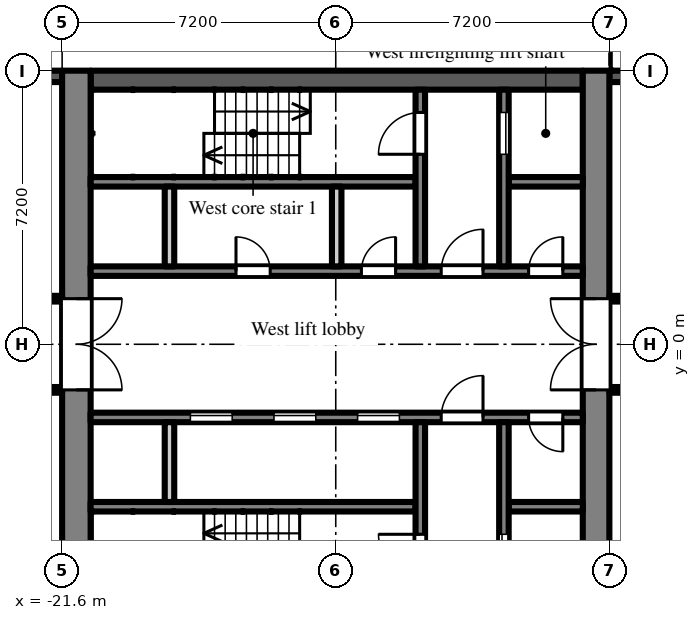
"""IFC4 building model, lengths in metres.
Left out: names, types, materials, properties, quantities, classifications, styles, units other than length and angle.
Written with IfcOpenShell. Run it as: python <this file> out.ifc"""

import sys

from ifc_helpers import new_model, si_unit, direction, frame, frame_2d, origin, place, context, subcontext, project, spatial, rectangle, extrude, element, fill, save


model = new_model("IFC4")
c1 = context("Model", 3, precision=1e-05, world=origin(), true_north=direction((0.0, 1.0)))
c2 = subcontext(c1, "Body", "Model", "MODEL_VIEW")
j1 = project(units=[si_unit("LENGTHUNIT", "METRE"), si_unit("PLANEANGLEUNIT", "RADIAN")], contexts=[c1])
p1 = place(None, origin())
s1 = spatial("IfcSite", under=j1, at=p1, CompositionType="ELEMENT")
p2 = place(p1, origin())
s2 = spatial("IfcBuilding", under=s1, at=p2, CompositionType="ELEMENT")
p3 = place(p2, frame((0.0, 0.0, 75.9)))
s3 = spatial("IfcBuildingStorey", under=s2, at=p3, CompositionType="ELEMENT", Elevation=75.9)
p4 = place(p3, frame((-4.2, 7.05, 0.0), z_axis=(0.0, 0.0, 1.0), x_axis=(-1.0, 0.0, 0.0)))
e1 = element("IfcWall", 1, at=p4, inside=s3, PredefinedType="SOLIDWALL", context=c2, shape_type="SweptSolid", body=[
    extrude(rectangle(XDim=3.0, YDim=0.3, at=frame_2d((1.5, 0.0))), origin(), (0.0, 0.0, 1.0), 2.1),
])
p5 = place(p3, frame((-21.6, 7.05, 0.0), z_axis=(0.0, 0.0, 1.0), x_axis=(-1.0, 0.0, 0.0)))
e2 = element("IfcWall", 2, at=p5, inside=s3, PredefinedType="SOLIDWALL", context=c2, shape_type="SweptSolid", body=[
    extrude(rectangle(XDim=2.7, YDim=0.3, at=frame_2d((1.35, 0.0))), origin(), (0.0, 0.0, 1.0), 2.1),
])
p6 = place(p3, frame((-7.55, -7.2, 0.0), z_axis=(0.0, 0.0, 1.0), x_axis=(0.0, 1.0, 0.0)))
e3 = element("IfcWall", 3, at=p6, inside=s3, PredefinedType="SHEAR", context=c2, shape_type="SweptSolid", body=[
    extrude(rectangle(XDim=14.4, YDim=0.7, at=frame_2d((7.2, 0.0))), origin(), (0.0, 0.0, 1.0), 2.575),
])
p7 = place(p6, frame((6.0, 0.0, 0.0)))
e4 = element("IfcOpeningElement", 4, at=p7, cuts=e3, PredefinedType="OPENING", context=c2, shape_type="SweptSolid", body=[
    extrude(rectangle(XDim=2.4, YDim=2.2, at=frame_2d((1.2, 1.1))), frame((0.0, 0.36, 0.0), z_axis=(0.0, -1.0, 0.0), x_axis=(1.0, 0.0, 0.0)), (0.0, 0.0, 1.0), 0.72),
])
p8 = place(p3, frame((-21.225, -7.2, 0.0), z_axis=(0.0, 0.0, 1.0), x_axis=(0.0, 1.0, 0.0)))
e5 = element("IfcWall", 5, at=p8, inside=s3, PredefinedType="SHEAR", context=c2, shape_type="SweptSolid", body=[
    extrude(rectangle(XDim=14.4, YDim=0.75, at=frame_2d((7.2, 0.0))), origin(), (0.0, 0.0, 1.0), 2.575),
])
p9 = place(p8, frame((6.0, 0.0, 0.0)))
e6 = element("IfcOpeningElement", 6, at=p9, cuts=e5, PredefinedType="OPENING", context=c2, shape_type="SweptSolid", body=[
    extrude(rectangle(XDim=2.4, YDim=2.2, at=frame_2d((1.2, 1.1))), frame((0.0, 0.385, 0.0), z_axis=(0.0, -1.0, 0.0), x_axis=(1.0, 0.0, 0.0)), (0.0, 0.0, 1.0), 0.77),
])
p10 = place(p3, frame((-7.9, 6.95, 0.0), z_axis=(0.0, 0.0, 1.0), x_axis=(-1.0, 0.0, 0.0)))
e7 = element("IfcWall", 7, at=p10, inside=s3, PredefinedType="SHEAR", context=c2, shape_type="SweptSolid", body=[
    extrude(rectangle(XDim=12.95, YDim=0.5, at=frame_2d((6.475, 0.0))), origin(), (0.0, 0.0, 1.0), 2.575),
])
p11 = place(p3, frame((-7.9, 1.925, 0.0), z_axis=(0.0, 0.0, 1.0), x_axis=(-1.0, 0.0, 0.0)))
e8 = element("IfcWall", 8, at=p11, inside=s3, PredefinedType="SHEAR", context=c2, shape_type="SweptSolid", body=[
    extrude(rectangle(XDim=12.95, YDim=0.25, at=frame_2d((6.475, 0.0))), origin(), (0.0, 0.0, 1.0), 2.575),
])
p12 = place(p11, frame((0.525, 0.0, 0.0)))
e9 = element("IfcOpeningElement", 9, at=p12, cuts=e8, PredefinedType="OPENING", context=c2, shape_type="SweptSolid", body=[
    extrude(rectangle(XDim=0.9, YDim=2.1, at=frame_2d((0.45, 1.05))), frame((0.0, 0.135, 0.0), z_axis=(0.0, -1.0, 0.0), x_axis=(1.0, 0.0, 0.0)), (0.0, 0.0, 1.0), 0.27),
])
p13 = place(p11, frame((2.625, 0.0, 0.0)))
e10 = element("IfcOpeningElement", 10, at=p13, cuts=e8, PredefinedType="OPENING", context=c2, shape_type="SweptSolid", body=[
    extrude(rectangle(XDim=1.1, YDim=2.1, at=frame_2d((0.55, 1.05))), frame((0.0, 0.135, 0.0), z_axis=(0.0, -1.0, 0.0), x_axis=(1.0, 0.0, 0.0)), (0.0, 0.0, 1.0), 0.27),
])
p14 = place(p11, frame((4.925, 0.0, 0.0)))
e11 = element("IfcOpeningElement", 11, at=p14, cuts=e8, PredefinedType="OPENING", context=c2, shape_type="SweptSolid", body=[
    extrude(rectangle(XDim=0.9, YDim=2.1, at=frame_2d((0.45, 1.05))), frame((0.0, 0.135, 0.0), z_axis=(0.0, -1.0, 0.0), x_axis=(1.0, 0.0, 0.0)), (0.0, 0.0, 1.0), 0.27),
])
p15 = place(p11, frame((8.225, 0.0, 0.0)))
e12 = element("IfcOpeningElement", 12, at=p15, cuts=e8, PredefinedType="OPENING", context=c2, shape_type="SweptSolid", body=[
    extrude(rectangle(XDim=0.9, YDim=2.1, at=frame_2d((0.45, 1.05))), frame((0.0, 0.135, 0.0), z_axis=(0.0, -1.0, 0.0), x_axis=(1.0, 0.0, 0.0)), (0.0, 0.0, 1.0), 0.27),
])
p16 = place(p3, frame((-7.9, 4.275, 0.0), z_axis=(0.0, 0.0, 1.0), x_axis=(-1.0, 0.0, 0.0)))
e13 = element("IfcWall", 13, at=p16, inside=s3, PredefinedType="SHEAR", context=c2, shape_type="SweptSolid", body=[
    extrude(rectangle(XDim=1.95, YDim=0.25, at=frame_2d((0.975, 0.0))), origin(), (0.0, 0.0, 1.0), 2.575),
])
p17 = place(p3, frame((-12.3, 4.275, 0.0), z_axis=(0.0, 0.0, 1.0), x_axis=(-1.0, 0.0, 0.0)))
e14 = element("IfcWall", 14, at=p17, inside=s3, PredefinedType="SHEAR", context=c2, shape_type="SweptSolid", body=[
    extrude(rectangle(XDim=8.55, YDim=0.25, at=frame_2d((4.275, 0.0))), origin(), (0.0, 0.0, 1.0), 2.575),
])
p18 = place(p3, frame((-9.975, 2.05, 0.0), z_axis=(0.0, 0.0, 1.0), x_axis=(0.0, 1.0, 0.0)))
e15 = element("IfcWall", 15, at=p18, inside=s3, PredefinedType="SHEAR", context=c2, shape_type="SweptSolid", body=[
    extrude(rectangle(XDim=4.65, YDim=0.25, at=frame_2d((2.325, 0.0))), origin(), (0.0, 0.0, 1.0), 2.575),
])
p19 = place(p18, frame((2.95, 0.0, 0.0)))
e16 = element("IfcOpeningElement", 16, at=p19, cuts=e15, PredefinedType="OPENING", context=c2, shape_type="SweptSolid", body=[
    extrude(rectangle(XDim=1.1, YDim=2.1, at=frame_2d((0.55, 1.05))), frame((0.0, 0.135, 0.0), z_axis=(0.0, -1.0, 0.0), x_axis=(1.0, 0.0, 0.0)), (0.0, 0.0, 1.0), 0.27),
])
p20 = place(p3, frame((-12.175, 2.05, 0.0), z_axis=(0.0, 0.0, 1.0), x_axis=(0.0, 1.0, 0.0)))
e17 = element("IfcWall", 17, at=p20, inside=s3, PredefinedType="SHEAR", context=c2, shape_type="SweptSolid", body=[
    extrude(rectangle(XDim=4.65, YDim=0.25, at=frame_2d((2.325, 0.0))), origin(), (0.0, 0.0, 1.0), 2.575),
])
p21 = place(p20, frame((2.95, 0.0, 0.0)))
e18 = element("IfcOpeningElement", 18, at=p21, cuts=e17, PredefinedType="OPENING", context=c2, shape_type="SweptSolid", body=[
    extrude(rectangle(XDim=1.1, YDim=2.1, at=frame_2d((0.55, 1.05))), frame((0.0, 0.135, 0.0), z_axis=(0.0, -1.0, 0.0), x_axis=(1.0, 0.0, 0.0)), (0.0, 0.0, 1.0), 0.27),
])
for number, where, z_axis, x_axis in (
    (19, (-14.375, 2.05, 0.0), (0.0, 0.0, 1.0), (0.0, 1.0, 0.0)),
    (20, (-18.775, 2.05, 0.0), (0.0, 0.0, 1.0), (0.0, 1.0, 0.0)),
):
    element("IfcWall", number, at=place(p3, frame(where, z_axis=z_axis, x_axis=x_axis)), inside=s3, PredefinedType="PARTITIONING", context=c2, shape_type="SweptSolid", body=[
        extrude(rectangle(XDim=2.1, YDim=0.25, at=frame_2d((1.05, 0.0))), origin(), (0.0, 0.0, 1.0), 2.575),
    ])
p22 = place(p3, frame((-7.9, -1.925, 0.0), z_axis=(0.0, 0.0, 1.0), x_axis=(-1.0, 0.0, 0.0)))
e21 = element("IfcWall", 21, at=p22, inside=s3, PredefinedType="SHEAR", context=c2, shape_type="SweptSolid", body=[
    extrude(rectangle(XDim=12.95, YDim=0.25, at=frame_2d((6.475, 0.0))), origin(), (0.0, 0.0, 1.0), 2.575),
])
p23 = place(p22, frame((4.825, 0.0, 0.0)))
e22 = element("IfcOpeningElement", 22, at=p23, cuts=e21, PredefinedType="OPENING", context=c2, shape_type="SweptSolid", body=[
    extrude(rectangle(XDim=1.1, YDim=2.1, at=frame_2d((0.55, 1.05))), frame((0.0, 0.135, 0.0), z_axis=(0.0, -1.0, 0.0), x_axis=(1.0, 0.0, 0.0)), (0.0, 0.0, 1.0), 0.27),
])
p24 = place(p22, frame((7.025, 0.0, 0.0)))
e23 = element("IfcOpeningElement", 23, at=p24, cuts=e21, PredefinedType="OPENING", context=c2, shape_type="SweptSolid", body=[
    extrude(rectangle(XDim=1.1, YDim=2.1, at=frame_2d((0.55, 1.05))), frame((0.0, 0.135, 0.0), z_axis=(0.0, -1.0, 0.0), x_axis=(1.0, 0.0, 0.0)), (0.0, 0.0, 1.0), 0.27),
])
p25 = place(p22, frame((9.225, 0.0, 0.0)))
e24 = element("IfcOpeningElement", 24, at=p25, cuts=e21, PredefinedType="OPENING", context=c2, shape_type="SweptSolid", body=[
    extrude(rectangle(XDim=1.1, YDim=2.1, at=frame_2d((0.55, 1.05))), frame((0.0, 0.135, 0.0), z_axis=(0.0, -1.0, 0.0), x_axis=(1.0, 0.0, 0.0)), (0.0, 0.0, 1.0), 0.27),
])
p26 = place(p22, frame((0.525, 0.0, 0.0)))
e25 = element("IfcOpeningElement", 25, at=p26, cuts=e21, PredefinedType="OPENING", context=c2, shape_type="SweptSolid", body=[
    extrude(rectangle(XDim=0.9, YDim=2.1, at=frame_2d((0.45, 1.05))), frame((0.0, 0.135, 0.0), z_axis=(0.0, -1.0, 0.0), x_axis=(1.0, 0.0, 0.0)), (0.0, 0.0, 1.0), 0.27),
])
p27 = place(p22, frame((2.625, 0.0, 0.0)))
e26 = element("IfcOpeningElement", 26, at=p27, cuts=e21, PredefinedType="OPENING", context=c2, shape_type="SweptSolid", body=[
    extrude(rectangle(XDim=1.1, YDim=2.1, at=frame_2d((0.55, 1.05))), frame((0.0, 0.135, 0.0), z_axis=(0.0, -1.0, 0.0), x_axis=(1.0, 0.0, 0.0)), (0.0, 0.0, 1.0), 0.27),
])
p28 = place(p3, frame((-7.9, -4.275, 0.0), z_axis=(0.0, 0.0, 1.0), x_axis=(-1.0, 0.0, 0.0)))
e27 = element("IfcWall", 27, at=p28, inside=s3, PredefinedType="SHEAR", context=c2, shape_type="SweptSolid", body=[
    extrude(rectangle(XDim=1.95, YDim=0.25, at=frame_2d((0.975, 0.0))), origin(), (0.0, 0.0, 1.0), 2.575),
])
p29 = place(p3, frame((-12.3, -4.275, 0.0), z_axis=(0.0, 0.0, 1.0), x_axis=(-1.0, 0.0, 0.0)))
e28 = element("IfcWall", 28, at=p29, inside=s3, PredefinedType="SHEAR", context=c2, shape_type="SweptSolid", body=[
    extrude(rectangle(XDim=8.55, YDim=0.25, at=frame_2d((4.275, 0.0))), origin(), (0.0, 0.0, 1.0), 2.575),
])
p30 = place(p3, frame((-9.975, -2.05, 0.0), z_axis=(0.0, 0.0, 1.0), x_axis=(0.0, -1.0, 0.0)))
e29 = element("IfcWall", 29, at=p30, inside=s3, PredefinedType="SHEAR", context=c2, shape_type="SweptSolid", body=[
    extrude(rectangle(XDim=4.65, YDim=0.25, at=frame_2d((2.325, 0.0))), origin(), (0.0, 0.0, 1.0), 2.575),
])
p31 = place(p30, frame((2.95, 0.0, 0.0)))
e30 = element("IfcOpeningElement", 30, at=p31, cuts=e29, PredefinedType="OPENING", context=c2, shape_type="SweptSolid", body=[
    extrude(rectangle(XDim=1.1, YDim=2.1, at=frame_2d((0.55, 1.05))), frame((0.0, 0.135, 0.0), z_axis=(0.0, -1.0, 0.0), x_axis=(1.0, 0.0, 0.0)), (0.0, 0.0, 1.0), 0.27),
])
p32 = place(p3, frame((-12.175, -2.05, 0.0), z_axis=(0.0, 0.0, 1.0), x_axis=(0.0, -1.0, 0.0)))
e31 = element("IfcWall", 31, at=p32, inside=s3, PredefinedType="SHEAR", context=c2, shape_type="SweptSolid", body=[
    extrude(rectangle(XDim=4.65, YDim=0.25, at=frame_2d((2.325, 0.0))), origin(), (0.0, 0.0, 1.0), 2.575),
])
p33 = place(p32, frame((2.95, 0.0, 0.0)))
e32 = element("IfcOpeningElement", 32, at=p33, cuts=e31, PredefinedType="OPENING", context=c2, shape_type="SweptSolid", body=[
    extrude(rectangle(XDim=1.1, YDim=2.1, at=frame_2d((0.55, 1.05))), frame((0.0, 0.135, 0.0), z_axis=(0.0, -1.0, 0.0), x_axis=(1.0, 0.0, 0.0)), (0.0, 0.0, 1.0), 0.27),
])
p34 = place(p3, frame((-18.775, -2.05, 0.0), z_axis=(0.0, 0.0, 1.0), x_axis=(0.0, -1.0, 0.0)))
e33 = element("IfcWall", 33, at=p34, inside=s3, PredefinedType="PARTITIONING", context=c2, shape_type="SweptSolid", body=[
    extrude(rectangle(XDim=2.1, YDim=0.25, at=frame_2d((1.05, 0.0))), origin(), (0.0, 0.0, 1.0), 2.575),
])
p35 = place(p3, frame((-36.5, -1.2, 0.0), z_axis=(0.0, 0.0, 1.0), x_axis=(1.0, 0.0, 0.0)))
e34 = element("IfcWall", 34, at=p35, inside=s3, PredefinedType="PARTITIONING", context=c2, shape_type="SweptSolid", body=[
    extrude(rectangle(XDim=14.9, YDim=0.15, at=frame_2d((7.45, 0.0))), origin(), (0.0, 0.0, 1.0), 2.575),
])
p36 = place(p35, frame((13.55, 0.0, 0.0)))
e35 = element("IfcOpeningElement", 35, at=p36, cuts=e34, PredefinedType="OPENING", context=c2, shape_type="SweptSolid", body=[
    extrude(rectangle(XDim=0.9, YDim=2.1, at=frame_2d((0.45, 1.05))), frame((0.0, 0.085, 0.0), z_axis=(0.0, -1.0, 0.0), x_axis=(1.0, 0.0, 0.0)), (0.0, 0.0, 1.0), 0.17),
])
p37 = place(p35, frame((11.75, 0.0, 0.0)))
e36 = element("IfcOpeningElement", 36, at=p37, cuts=e34, PredefinedType="OPENING", context=c2, shape_type="SweptSolid", body=[
    extrude(rectangle(XDim=0.9, YDim=2.1, at=frame_2d((0.45, 1.05))), frame((0.0, 0.085, 0.0), z_axis=(0.0, -1.0, 0.0), x_axis=(1.0, 0.0, 0.0)), (0.0, 0.0, 1.0), 0.17),
])
p38 = place(p35, frame((4.41, 0.0, 0.0)))
e37 = element("IfcOpeningElement", 37, at=p38, cuts=e34, PredefinedType="OPENING", context=c2, shape_type="SweptSolid", body=[
    extrude(rectangle(XDim=1.0, YDim=2.1, at=frame_2d((0.5, 1.05))), frame((0.0, 0.085, 0.0), z_axis=(0.0, -1.0, 0.0), x_axis=(1.0, 0.0, 0.0)), (0.0, 0.0, 1.0), 0.17),
])
p39 = place(p35, frame((1.15, 0.0, 0.0)))
e38 = element("IfcOpeningElement", 38, at=p39, cuts=e34, PredefinedType="OPENING", context=c2, shape_type="SweptSolid", body=[
    extrude(rectangle(XDim=1.8, YDim=2.1, at=frame_2d((0.9, 1.05))), frame((0.0, 0.085, 0.0), z_axis=(0.0, -1.0, 0.0), x_axis=(1.0, 0.0, 0.0)), (0.0, 0.0, 1.0), 0.17),
])
p40 = place(p3, frame((-36.5, 1.2, 0.0), z_axis=(0.0, 0.0, 1.0), x_axis=(1.0, 0.0, 0.0)))
e39 = element("IfcWall", 39, at=p40, inside=s3, PredefinedType="PARTITIONING", context=c2, shape_type="SweptSolid", body=[
    extrude(rectangle(XDim=14.9, YDim=0.15, at=frame_2d((7.45, 0.0))), origin(), (0.0, 0.0, 1.0), 2.575),
])
p41 = place(p40, frame((10.4, 0.0, 0.0)))
e40 = element("IfcOpeningElement", 40, at=p41, cuts=e39, PredefinedType="OPENING", context=c2, shape_type="SweptSolid", body=[
    extrude(rectangle(XDim=1.8, YDim=2.1, at=frame_2d((0.9, 1.05))), frame((0.0, 0.085, 0.0), z_axis=(0.0, -1.0, 0.0), x_axis=(1.0, 0.0, 0.0)), (0.0, 0.0, 1.0), 0.17),
])
p42 = place(p40, frame((6.35, 0.0, 0.0)))
e41 = element("IfcOpeningElement", 41, at=p42, cuts=e39, PredefinedType="OPENING", context=c2, shape_type="SweptSolid", body=[
    extrude(rectangle(XDim=0.9, YDim=2.1, at=frame_2d((0.45, 1.05))), frame((0.0, 0.085, 0.0), z_axis=(0.0, -1.0, 0.0), x_axis=(1.0, 0.0, 0.0)), (0.0, 0.0, 1.0), 0.17),
])
p43 = place(p40, frame((4.55, 0.0, 0.0)))
e42 = element("IfcOpeningElement", 42, at=p43, cuts=e39, PredefinedType="OPENING", context=c2, shape_type="SweptSolid", body=[
    extrude(rectangle(XDim=0.9, YDim=2.1, at=frame_2d((0.45, 1.05))), frame((0.0, 0.085, 0.0), z_axis=(0.0, -1.0, 0.0), x_axis=(1.0, 0.0, 0.0)), (0.0, 0.0, 1.0), 0.17),
])
p44 = place(p40, frame((1.15, 0.0, 0.0)))
e43 = element("IfcOpeningElement", 43, at=p44, cuts=e39, PredefinedType="OPENING", context=c2, shape_type="SweptSolid", body=[
    extrude(rectangle(XDim=1.8, YDim=2.1, at=frame_2d((0.9, 1.05))), frame((0.0, 0.085, 0.0), z_axis=(0.0, -1.0, 0.0), x_axis=(1.0, 0.0, 0.0)), (0.0, 0.0, 1.0), 0.17),
])
p45 = place(p3, frame((-7.2, -1.2, 0.0), z_axis=(0.0, 0.0, 1.0), x_axis=(1.0, 0.0, 0.0)))
e44 = element("IfcWall", 44, at=p45, inside=s3, PredefinedType="PARTITIONING", context=c2, shape_type="SweptSolid", body=[
    extrude(rectangle(XDim=6.075, YDim=0.15, at=frame_2d((3.038, 0.0))), origin(), (0.0, 0.0, 1.0), 2.575),
])
p46 = place(p45, frame((2.55, 0.0, 0.0)))
e45 = element("IfcOpeningElement", 45, at=p46, cuts=e44, PredefinedType="OPENING", context=c2, shape_type="SweptSolid", body=[
    extrude(rectangle(XDim=0.9, YDim=2.1, at=frame_2d((0.45, 1.05))), frame((0.0, 0.085, 0.0), z_axis=(0.0, -1.0, 0.0), x_axis=(1.0, 0.0, 0.0)), (0.0, 0.0, 1.0), 0.17),
])
p47 = place(p3, frame((-7.2, 1.2, 0.0), z_axis=(0.0, 0.0, 1.0), x_axis=(1.0, 0.0, 0.0)))
e46 = element("IfcWall", 46, at=p47, inside=s3, PredefinedType="PARTITIONING", context=c2, shape_type="SweptSolid", body=[
    extrude(rectangle(XDim=6.075, YDim=0.15, at=frame_2d((3.038, 0.0))), origin(), (0.0, 0.0, 1.0), 2.575),
])
p48 = place(p47, frame((0.55, 0.0, 0.0)))
e47 = element("IfcOpeningElement", 47, at=p48, cuts=e46, PredefinedType="OPENING", context=c2, shape_type="SweptSolid", body=[
    extrude(rectangle(XDim=0.9, YDim=2.1, at=frame_2d((0.45, 1.05))), frame((0.0, 0.085, 0.0), z_axis=(0.0, -1.0, 0.0), x_axis=(1.0, 0.0, 0.0)), (0.0, 0.0, 1.0), 0.17),
])
p49 = place(p23, origin())
e48 = element("IfcDoor", 48, at=p49, inside=s3, OperationType="SLIDING_TO_LEFT", PredefinedType="DOOR", context=c2, shape_type="SweptSolid", body=[
    extrude(rectangle(XDim=1.1, YDim=2.1, at=frame_2d((0.55, 1.05))), frame((0.0, 0.025, 0.0), z_axis=(0.0, -1.0, 0.0), x_axis=(1.0, 0.0, 0.0)), (0.0, 0.0, 1.0), 0.05),
])
fill(e22, e48)
p50 = place(p24, origin())
e49 = element("IfcDoor", 49, at=p50, inside=s3, OperationType="SLIDING_TO_LEFT", PredefinedType="DOOR", context=c2, shape_type="SweptSolid", body=[
    extrude(rectangle(XDim=1.1, YDim=2.1, at=frame_2d((0.55, 1.05))), frame((0.0, 0.025, 0.0), z_axis=(0.0, -1.0, 0.0), x_axis=(1.0, 0.0, 0.0)), (0.0, 0.0, 1.0), 0.05),
])
fill(e23, e49)
p51 = place(p25, origin())
e50 = element("IfcDoor", 50, at=p51, inside=s3, OperationType="SLIDING_TO_LEFT", PredefinedType="DOOR", context=c2, shape_type="SweptSolid", body=[
    extrude(rectangle(XDim=1.1, YDim=2.1, at=frame_2d((0.55, 1.05))), frame((0.0, 0.025, 0.0), z_axis=(0.0, -1.0, 0.0), x_axis=(1.0, 0.0, 0.0)), (0.0, 0.0, 1.0), 0.05),
])
fill(e24, e50)
p52 = place(p19, origin())
e51 = element("IfcDoor", 51, at=p52, inside=s3, OperationType="SLIDING_TO_LEFT", PredefinedType="DOOR", context=c2, shape_type="SweptSolid", body=[
    extrude(rectangle(XDim=1.1, YDim=2.1, at=frame_2d((0.55, 1.05))), frame((0.0, 0.025, 0.0), z_axis=(0.0, -1.0, 0.0), x_axis=(1.0, 0.0, 0.0)), (0.0, 0.0, 1.0), 0.05),
])
fill(e16, e51)
p53 = place(p31, origin())
e52 = element("IfcDoor", 52, at=p53, inside=s3, OperationType="SLIDING_TO_LEFT", PredefinedType="DOOR", context=c2, shape_type="SweptSolid", body=[
    extrude(rectangle(XDim=1.1, YDim=2.1, at=frame_2d((0.55, 1.05))), frame((0.0, 0.025, 0.0), z_axis=(0.0, -1.0, 0.0), x_axis=(1.0, 0.0, 0.0)), (0.0, 0.0, 1.0), 0.05),
])
fill(e30, e52)
p54 = place(p21, origin())
e53 = element("IfcDoor", 53, at=p54, inside=s3, OperationType="SINGLE_SWING_LEFT", PredefinedType="DOOR", context=c2, shape_type="SweptSolid", body=[
    extrude(rectangle(XDim=1.1, YDim=2.1, at=frame_2d((0.55, 1.05))), frame((0.0, 0.025, 0.0), z_axis=(0.0, -1.0, 0.0), x_axis=(1.0, 0.0, 0.0)), (0.0, 0.0, 1.0), 0.05),
])
fill(e18, e53)
p55 = place(p33, frame((1.1, 0.0, 0.0), z_axis=(0.0, 0.0, 1.0), x_axis=(-1.0, 0.0, 0.0)))
e54 = element("IfcDoor", 54, at=p55, inside=s3, OperationType="SINGLE_SWING_RIGHT", PredefinedType="DOOR", context=c2, shape_type="SweptSolid", body=[
    extrude(rectangle(XDim=1.1, YDim=2.1, at=frame_2d((0.55, 1.05))), frame((0.0, 0.025, 0.0), z_axis=(0.0, -1.0, 0.0), x_axis=(1.0, 0.0, 0.0)), (0.0, 0.0, 1.0), 0.05),
])
fill(e32, e54)
p56 = place(p12, frame((0.9, 0.0, 0.0), z_axis=(0.0, 0.0, 1.0), x_axis=(-1.0, 0.0, 0.0)))
e55 = element("IfcDoor", 55, at=p56, inside=s3, OperationType="SINGLE_SWING_RIGHT", PredefinedType="DOOR", context=c2, shape_type="SweptSolid", body=[
    extrude(rectangle(XDim=0.9, YDim=2.1, at=frame_2d((0.45, 1.05))), frame((0.0, 0.025, 0.0), z_axis=(0.0, -1.0, 0.0), x_axis=(1.0, 0.0, 0.0)), (0.0, 0.0, 1.0), 0.05),
])
fill(e9, e55)
p57 = place(p26, origin())
e56 = element("IfcDoor", 56, at=p57, inside=s3, OperationType="SINGLE_SWING_LEFT", PredefinedType="DOOR", context=c2, shape_type="SweptSolid", body=[
    extrude(rectangle(XDim=0.9, YDim=2.1, at=frame_2d((0.45, 1.05))), frame((0.0, 0.025, 0.0), z_axis=(0.0, -1.0, 0.0), x_axis=(1.0, 0.0, 0.0)), (0.0, 0.0, 1.0), 0.05),
])
fill(e25, e56)
p58 = place(p13, frame((1.1, 0.0, 0.0), z_axis=(0.0, 0.0, 1.0), x_axis=(-1.0, 0.0, 0.0)))
e57 = element("IfcDoor", 57, at=p58, inside=s3, OperationType="SINGLE_SWING_RIGHT", PredefinedType="DOOR", context=c2, shape_type="SweptSolid", body=[
    extrude(rectangle(XDim=1.1, YDim=2.1, at=frame_2d((0.55, 1.05))), frame((0.0, 0.025, 0.0), z_axis=(0.0, -1.0, 0.0), x_axis=(1.0, 0.0, 0.0)), (0.0, 0.0, 1.0), 0.05),
])
fill(e10, e57)
p59 = place(p27, frame((1.1, 0.0, 0.0), z_axis=(0.0, 0.0, 1.0), x_axis=(-1.0, 0.0, 0.0)))
e58 = element("IfcDoor", 58, at=p59, inside=s3, OperationType="SINGLE_SWING_RIGHT", PredefinedType="DOOR", context=c2, shape_type="SweptSolid", body=[
    extrude(rectangle(XDim=1.1, YDim=2.1, at=frame_2d((0.55, 1.05))), frame((0.0, 0.025, 0.0), z_axis=(0.0, -1.0, 0.0), x_axis=(1.0, 0.0, 0.0)), (0.0, 0.0, 1.0), 0.05),
])
fill(e26, e58)
p60 = place(p7, origin())
e59 = element("IfcDoor", 59, at=p60, inside=s3, OperationType="DOUBLE_DOOR_DOUBLE_SWING", PredefinedType="DOOR", context=c2, shape_type="SweptSolid", body=[
    extrude(rectangle(XDim=2.4, YDim=2.2, at=frame_2d((1.2, 1.1))), frame((0.0, 0.025, 0.0), z_axis=(0.0, -1.0, 0.0), x_axis=(1.0, 0.0, 0.0)), (0.0, 0.0, 1.0), 0.05),
])
fill(e4, e59)
p61 = place(p9, frame((2.4, 0.0, 0.0), z_axis=(0.0, 0.0, 1.0), x_axis=(-1.0, 0.0, 0.0)))
e60 = element("IfcDoor", 60, at=p61, inside=s3, OperationType="DOUBLE_DOOR_DOUBLE_SWING", PredefinedType="DOOR", context=c2, shape_type="SweptSolid", body=[
    extrude(rectangle(XDim=2.4, YDim=2.2, at=frame_2d((1.2, 1.1))), frame((0.0, 0.025, 0.0), z_axis=(0.0, -1.0, 0.0), x_axis=(1.0, 0.0, 0.0)), (0.0, 0.0, 1.0), 0.05),
])
fill(e6, e60)
p62 = place(p14, frame((0.9, 0.0, 0.0), z_axis=(0.0, 0.0, 1.0), x_axis=(-1.0, 0.0, 0.0)))
e61 = element("IfcDoor", 61, at=p62, inside=s3, OperationType="SINGLE_SWING_RIGHT", PredefinedType="DOOR", context=c2, shape_type="SweptSolid", body=[
    extrude(rectangle(XDim=0.9, YDim=2.1, at=frame_2d((0.45, 1.05))), frame((0.0, 0.025, 0.0), z_axis=(0.0, -1.0, 0.0), x_axis=(1.0, 0.0, 0.0)), (0.0, 0.0, 1.0), 0.05),
])
fill(e11, e61)
p63 = place(p15, frame((0.9, 0.0, 0.0), z_axis=(0.0, 0.0, 1.0), x_axis=(-1.0, 0.0, 0.0)))
e62 = element("IfcDoor", 62, at=p63, inside=s3, OperationType="SINGLE_SWING_LEFT", PredefinedType="DOOR", context=c2, shape_type="SweptSolid", body=[
    extrude(rectangle(XDim=0.9, YDim=2.1, at=frame_2d((0.45, 1.05))), frame((0.0, 0.025, 0.0), z_axis=(0.0, -1.0, 0.0), x_axis=(1.0, 0.0, 0.0)), (0.0, 0.0, 1.0), 0.05),
])
fill(e12, e62)
save(model, sys.argv[1])
